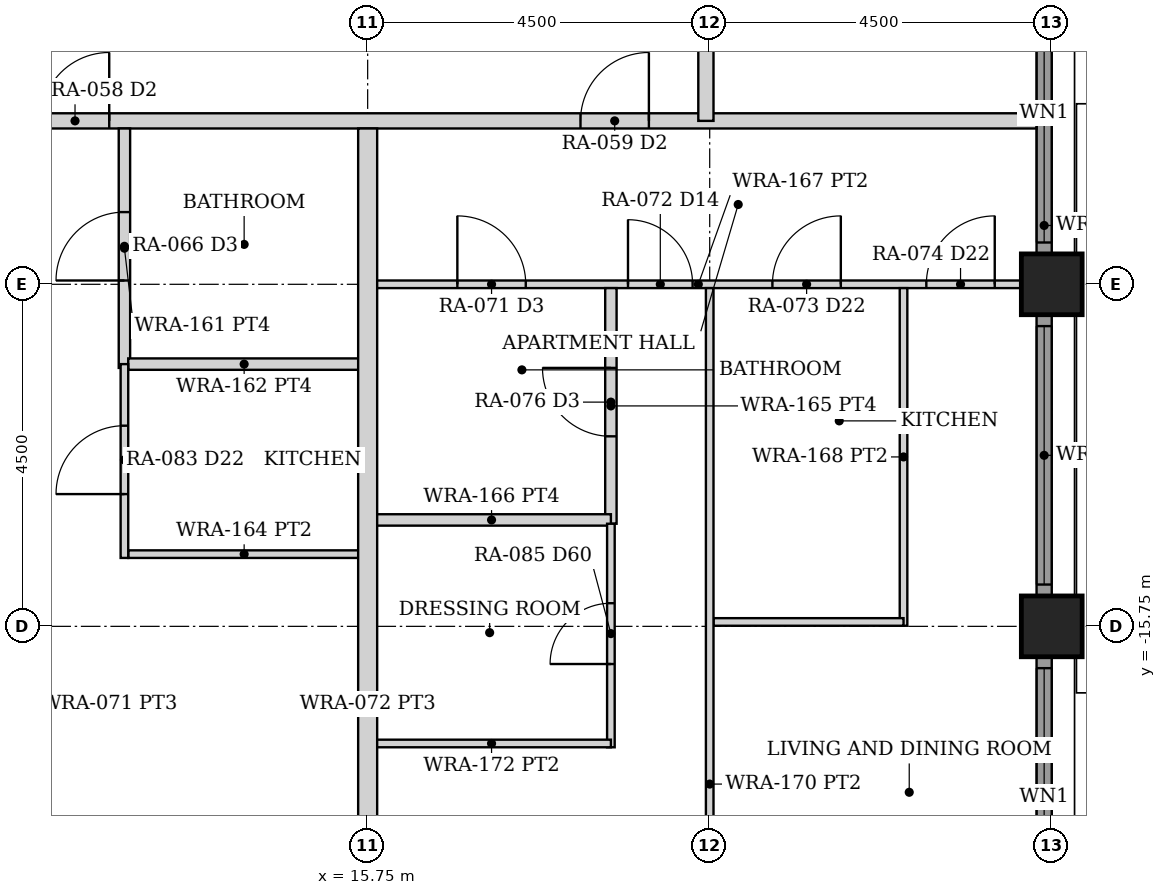
"""IFC4 building model, lengths in metres.
Left out: names, types, materials, properties, quantities, classifications, styles, units other than length and angle.
Written with IfcOpenShell. Run it as: python <this file> out.ifc"""

import sys

from ifc_helpers import new_model, si_unit, direction, frame, frame_2d, origin, origin_2d, place, context, subcontext, project, spatial, rectangle, hollow_rectangle, extrude, element, fill, save


model = new_model("IFC4")
c1 = context("Model", 3, precision=1e-05, world=origin(), true_north=direction((0.0, 1.0)))
c2 = subcontext(c1, "Body", "Model", "MODEL_VIEW")
j1 = project(units=[si_unit("LENGTHUNIT", "METRE"), si_unit("PLANEANGLEUNIT", "RADIAN")], contexts=[c1])
p1 = place(None, origin())
s1 = spatial("IfcSite", under=j1, at=p1, CompositionType="ELEMENT")
p2 = place(p1, origin())
s2 = spatial("IfcBuilding", under=s1, at=p2, CompositionType="ELEMENT")
p3 = place(p2, frame((0.0, 0.0, 26.5)))
s3 = spatial("IfcBuildingStorey", under=s2, at=p3, CompositionType="ELEMENT", Elevation=26.5)
for number, where, z_axis, x_axis in (
    (1, (24.75, -15.75, 0.0), (0.0, 0.0, 1.0), (1.0, 0.0, 0.0)),
    (2, (24.75, -11.25, 0.0), (0.0, 0.0, 1.0), (1.0, 0.0, 0.0)),
):
    element("IfcColumn", number, at=place(p3, frame(where, z_axis=z_axis, x_axis=x_axis)), inside=s3, PredefinedType="COLUMN", context=c2, shape_type="SweptSolid", body=[
        extrude(hollow_rectangle(XDim=0.8, YDim=0.8, WallThickness=0.08, at=origin_2d()), origin(), (0.0, 0.0, 1.0), 3.5),
    ])
p4 = place(p3, frame((24.65, -19.845, 0.0), z_axis=(0.0, 0.0, 1.0), x_axis=(0.0, 1.0, 0.0)))
e3 = element("IfcWall", 3, at=p4, inside=s3, PredefinedType="SOLIDWALL", context=c2, shape_type="SweptSolid", body=[
    extrude(rectangle(XDim=3.69, YDim=0.2, at=frame_2d((1.845, 0.0))), origin(), (0.0, 0.0, 1.0), 2.379),
])
p5 = place(p4, frame((0.145, 0.0, 0.3)))
e4 = element("IfcOpeningElement", 4, at=p5, cuts=e3, PredefinedType="OPENING", context=c2, shape_type="SweptSolid", body=[
    extrude(rectangle(XDim=3.4, YDim=1.929, at=frame_2d((1.7, 0.964))), frame((0.0, 0.11, 0.0), z_axis=(0.0, -1.0, 0.0), x_axis=(1.0, 0.0, 0.0)), (0.0, 0.0, 1.0), 0.22),
])
p6 = place(p3, frame((24.65, -15.345, 0.0), z_axis=(0.0, 0.0, 1.0), x_axis=(0.0, 1.0, 0.0)))
e5 = element("IfcWall", 5, at=p6, inside=s3, PredefinedType="SOLIDWALL", context=c2, shape_type="SweptSolid", body=[
    extrude(rectangle(XDim=3.69, YDim=0.2, at=frame_2d((1.845, 0.0))), origin(), (0.0, 0.0, 1.0), 2.379),
])
p7 = place(p6, frame((0.145, 0.0, 0.3)))
e6 = element("IfcOpeningElement", 6, at=p7, cuts=e5, PredefinedType="OPENING", context=c2, shape_type="SweptSolid", body=[
    extrude(rectangle(XDim=3.4, YDim=1.929, at=frame_2d((1.7, 0.964))), frame((0.0, 0.11, 0.0), z_axis=(0.0, -1.0, 0.0), x_axis=(1.0, 0.0, 0.0)), (0.0, 0.0, 1.0), 0.22),
])
p8 = place(p3, frame((24.65, -10.845, 0.0), z_axis=(0.0, 0.0, 1.0), x_axis=(0.0, 1.0, 0.0)))
e7 = element("IfcWall", 7, at=p8, inside=s3, PredefinedType="SOLIDWALL", context=c2, shape_type="SweptSolid", body=[
    extrude(rectangle(XDim=3.69, YDim=0.2, at=frame_2d((1.845, 0.0))), origin(), (0.0, 0.0, 1.0), 2.379),
])
p9 = place(p8, frame((0.145, 0.0, 0.3)))
e8 = element("IfcOpeningElement", 8, at=p9, cuts=e7, PredefinedType="OPENING", context=c2, shape_type="SweptSolid", body=[
    extrude(rectangle(XDim=3.4, YDim=1.929, at=frame_2d((1.7, 0.964))), frame((0.0, 0.11, 0.0), z_axis=(0.0, -1.0, 0.0), x_axis=(1.0, 0.0, 0.0)), (0.0, 0.0, 1.0), 0.22),
])
p10 = place(p3, frame((-24.55, -9.1, 0.0), z_axis=(0.0, 0.0, 1.0), x_axis=(1.0, 0.0, 0.0)))
e9 = element("IfcWall", 9, at=p10, inside=s3, PredefinedType="PARTITIONING", context=c2, shape_type="SweptSolid", body=[
    extrude(rectangle(XDim=49.1, YDim=0.2, at=frame_2d((24.55, 0.0))), origin(), (0.0, 0.0, 1.0), 2.373),
])
p11 = place(p10, frame((5.1, 0.0, 0.0)))
e10 = element("IfcOpeningElement", 10, at=p11, cuts=e9, PredefinedType="OPENING", context=c2, shape_type="SweptSolid", body=[
    extrude(rectangle(XDim=0.9, YDim=2.1, at=frame_2d((0.45, 1.05))), frame((0.0, 0.11, 0.0), z_axis=(0.0, -1.0, 0.0), x_axis=(1.0, 0.0, 0.0)), (0.0, 0.0, 1.0), 0.22),
])
p12 = place(p10, frame((9.0, 0.0, 0.0)))
e11 = element("IfcOpeningElement", 11, at=p12, cuts=e9, PredefinedType="OPENING", context=c2, shape_type="SweptSolid", body=[
    extrude(rectangle(XDim=0.9, YDim=2.1, at=frame_2d((0.45, 1.05))), frame((0.0, 0.11, 0.0), z_axis=(0.0, -1.0, 0.0), x_axis=(1.0, 0.0, 0.0)), (0.0, 0.0, 1.0), 0.22),
])
p13 = place(p10, frame((13.5, 0.0, 0.0)))
e12 = element("IfcOpeningElement", 12, at=p13, cuts=e9, PredefinedType="OPENING", context=c2, shape_type="SweptSolid", body=[
    extrude(rectangle(XDim=0.9, YDim=2.1, at=frame_2d((0.45, 1.05))), frame((0.0, 0.11, 0.0), z_axis=(0.0, -1.0, 0.0), x_axis=(1.0, 0.0, 0.0)), (0.0, 0.0, 1.0), 0.22),
])
p14 = place(p10, frame((18.0, 0.0, 0.0)))
e13 = element("IfcOpeningElement", 13, at=p14, cuts=e9, PredefinedType="OPENING", context=c2, shape_type="SweptSolid", body=[
    extrude(rectangle(XDim=0.9, YDim=2.1, at=frame_2d((0.45, 1.05))), frame((0.0, 0.11, 0.0), z_axis=(0.0, -1.0, 0.0), x_axis=(1.0, 0.0, 0.0)), (0.0, 0.0, 1.0), 0.22),
])
p15 = place(p10, frame((22.5, 0.0, 0.0)))
e14 = element("IfcOpeningElement", 14, at=p15, cuts=e9, PredefinedType="OPENING", context=c2, shape_type="SweptSolid", body=[
    extrude(rectangle(XDim=0.9, YDim=2.1, at=frame_2d((0.45, 1.05))), frame((0.0, 0.11, 0.0), z_axis=(0.0, -1.0, 0.0), x_axis=(1.0, 0.0, 0.0)), (0.0, 0.0, 1.0), 0.22),
])
p16 = place(p10, frame((27.0, 0.0, 0.0)))
e15 = element("IfcOpeningElement", 15, at=p16, cuts=e9, PredefinedType="OPENING", context=c2, shape_type="SweptSolid", body=[
    extrude(rectangle(XDim=0.9, YDim=2.1, at=frame_2d((0.45, 1.05))), frame((0.0, 0.11, 0.0), z_axis=(0.0, -1.0, 0.0), x_axis=(1.0, 0.0, 0.0)), (0.0, 0.0, 1.0), 0.22),
])
p17 = place(p10, frame((31.5, 0.0, 0.0)))
e16 = element("IfcOpeningElement", 16, at=p17, cuts=e9, PredefinedType="OPENING", context=c2, shape_type="SweptSolid", body=[
    extrude(rectangle(XDim=0.9, YDim=2.1, at=frame_2d((0.45, 1.05))), frame((0.0, 0.11, 0.0), z_axis=(0.0, -1.0, 0.0), x_axis=(1.0, 0.0, 0.0)), (0.0, 0.0, 1.0), 0.22),
])
p18 = place(p10, frame((36.0, 0.0, 0.0)))
e17 = element("IfcOpeningElement", 17, at=p18, cuts=e9, PredefinedType="OPENING", context=c2, shape_type="SweptSolid", body=[
    extrude(rectangle(XDim=0.9, YDim=2.1, at=frame_2d((0.45, 1.05))), frame((0.0, 0.11, 0.0), z_axis=(0.0, -1.0, 0.0), x_axis=(1.0, 0.0, 0.0)), (0.0, 0.0, 1.0), 0.22),
])
p19 = place(p10, frame((43.1, 0.0, 0.0)))
e18 = element("IfcOpeningElement", 18, at=p19, cuts=e9, PredefinedType="OPENING", context=c2, shape_type="SweptSolid", body=[
    extrude(rectangle(XDim=0.9, YDim=2.1, at=frame_2d((0.45, 1.05))), frame((0.0, 0.11, 0.0), z_axis=(0.0, -1.0, 0.0), x_axis=(1.0, 0.0, 0.0)), (0.0, 0.0, 1.0), 0.22),
])
p20 = place(p3, frame((20.2, -9.1, 0.0), z_axis=(0.0, 0.0, 1.0), x_axis=(0.0, 1.0, 0.0)))
e19 = element("IfcWall", 19, at=p20, inside=s3, PredefinedType="PARTITIONING", context=c2, shape_type="SweptSolid", body=[
    extrude(rectangle(XDim=18.2, YDim=0.2, at=frame_2d((9.1, 0.0))), origin(), (0.0, 0.0, 1.0), 2.373),
])
p21 = place(p20, frame((6.4, 0.0, 0.0)))
e20 = element("IfcOpeningElement", 20, at=p21, cuts=e19, PredefinedType="OPENING", context=c2, shape_type="SweptSolid", body=[
    extrude(rectangle(XDim=0.9, YDim=2.1, at=frame_2d((0.45, 1.05))), frame((0.0, 0.11, 0.0), z_axis=(0.0, -1.0, 0.0), x_axis=(1.0, 0.0, 0.0)), (0.0, 0.0, 1.0), 0.22),
])
p22 = place(p3, frame((12.55, -12.35, 0.0), z_axis=(0.0, 0.0, 1.0), x_axis=(0.0, 1.0, 0.0)))
e21 = element("IfcWall", 21, at=p22, inside=s3, PredefinedType="PARTITIONING", context=c2, shape_type="SweptSolid", body=[
    extrude(rectangle(XDim=3.15, YDim=0.15, at=frame_2d((1.575, 0.0))), origin(), (0.0, 0.0, 1.0), 2.373),
])
p23 = place(p22, frame((1.15, 0.0, 0.0)))
e22 = element("IfcOpeningElement", 22, at=p23, cuts=e21, PredefinedType="OPENING", context=c2, shape_type="SweptSolid", body=[
    extrude(rectangle(XDim=0.9, YDim=2.1, at=frame_2d((0.45, 1.05))), frame((0.0, 0.085, 0.0), z_axis=(0.0, -1.0, 0.0), x_axis=(1.0, 0.0, 0.0)), (0.0, 0.0, 1.0), 0.17),
])
p24 = place(p3, frame((12.6, -12.3, 0.0), z_axis=(0.0, 0.0, 1.0), x_axis=(1.0, 0.0, 0.0)))
e23 = element("IfcWall", 23, at=p24, inside=s3, PredefinedType="PARTITIONING", context=c2, shape_type="SweptSolid", body=[
    extrude(rectangle(XDim=3.05, YDim=0.15, at=frame_2d((1.525, 0.0))), origin(), (0.0, 0.0, 1.0), 2.373),
])
p25 = place(p3, frame((12.6, -14.8, 0.0), z_axis=(0.0, 0.0, 1.0), x_axis=(1.0, 0.0, 0.0)))
e24 = element("IfcWall", 24, at=p25, inside=s3, PredefinedType="PARTITIONING", context=c2, shape_type="SweptSolid", body=[
    extrude(rectangle(XDim=3.05, YDim=0.1, at=frame_2d((1.525, 0.0))), origin(), (0.0, 0.0, 1.0), 2.373),
])
p26 = place(p3, frame((12.55, -14.85, 0.0), z_axis=(0.0, 0.0, 1.0), x_axis=(0.0, 1.0, 0.0)))
e25 = element("IfcWall", 25, at=p26, inside=s3, PredefinedType="PARTITIONING", context=c2, shape_type="SweptSolid", body=[
    extrude(rectangle(XDim=2.55, YDim=0.1, at=frame_2d((1.275, 0.0))), origin(), (0.0, 0.0, 1.0), 2.373),
])
p27 = place(p26, frame((0.84, 0.0, 0.0)))
e26 = element("IfcOpeningElement", 26, at=p27, cuts=e25, PredefinedType="OPENING", context=c2, shape_type="SweptSolid", body=[
    extrude(rectangle(XDim=0.9, YDim=2.1, at=frame_2d((0.45, 1.05))), frame((0.0, 0.06, 0.0), z_axis=(0.0, -1.0, 0.0), x_axis=(1.0, 0.0, 0.0)), (0.0, 0.0, 1.0), 0.12),
])
p28 = place(p3, frame((15.85, -11.25, 0.0), z_axis=(0.0, 0.0, 1.0), x_axis=(1.0, 0.0, 0.0)))
e27 = element("IfcWall", 27, at=p28, inside=s3, PredefinedType="PARTITIONING", context=c2, shape_type="SweptSolid", body=[
    extrude(rectangle(XDim=8.5, YDim=0.1, at=frame_2d((4.25, 0.0))), origin(), (0.0, 0.0, 1.0), 2.373),
])
p29 = place(p28, frame((5.225, 0.0, 0.0)))
e28 = element("IfcOpeningElement", 28, at=p29, cuts=e27, PredefinedType="OPENING", context=c2, shape_type="SweptSolid", body=[
    extrude(rectangle(XDim=0.9, YDim=2.1, at=frame_2d((0.45, 1.05))), frame((0.0, 0.06, 0.0), z_axis=(0.0, -1.0, 0.0), x_axis=(1.0, 0.0, 0.0)), (0.0, 0.0, 1.0), 0.12),
])
p30 = place(p28, frame((7.25, 0.0, 0.0)))
e29 = element("IfcOpeningElement", 29, at=p30, cuts=e27, PredefinedType="OPENING", context=c2, shape_type="SweptSolid", body=[
    extrude(rectangle(XDim=0.9, YDim=2.1, at=frame_2d((0.45, 1.05))), frame((0.0, 0.06, 0.0), z_axis=(0.0, -1.0, 0.0), x_axis=(1.0, 0.0, 0.0)), (0.0, 0.0, 1.0), 0.12),
])
p31 = place(p28, frame((3.325, 0.0, 0.0)))
e30 = element("IfcOpeningElement", 30, at=p31, cuts=e27, PredefinedType="OPENING", context=c2, shape_type="SweptSolid", body=[
    extrude(rectangle(XDim=0.85, YDim=2.1, at=frame_2d((0.425, 1.05))), frame((0.0, 0.06, 0.0), z_axis=(0.0, -1.0, 0.0), x_axis=(1.0, 0.0, 0.0)), (0.0, 0.0, 1.0), 0.12),
])
p32 = place(p28, frame((1.08, 0.0, 0.0)))
e31 = element("IfcOpeningElement", 31, at=p32, cuts=e27, PredefinedType="OPENING", context=c2, shape_type="SweptSolid", body=[
    extrude(rectangle(XDim=0.9, YDim=2.1, at=frame_2d((0.45, 1.05))), frame((0.0, 0.06, 0.0), z_axis=(0.0, -1.0, 0.0), x_axis=(1.0, 0.0, 0.0)), (0.0, 0.0, 1.0), 0.12),
])
p33 = place(p3, frame((22.8, -15.742, 0.0), z_axis=(0.0, 0.0, 1.0), x_axis=(0.0, 1.0, 0.0)))
e32 = element("IfcWall", 32, at=p33, inside=s3, PredefinedType="PARTITIONING", context=c2, shape_type="SweptSolid", body=[
    extrude(rectangle(XDim=4.442, YDim=0.1, at=frame_2d((2.221, 0.0))), origin(), (0.0, 0.0, 1.0), 2.373),
])
p34 = place(p3, frame((20.3, -15.692, 0.0), z_axis=(0.0, 0.0, 1.0), x_axis=(1.0, 0.0, 0.0)))
e33 = element("IfcWall", 33, at=p34, inside=s3, PredefinedType="PARTITIONING", context=c2, shape_type="SweptSolid", body=[
    extrude(rectangle(XDim=2.5, YDim=0.1, at=frame_2d((1.25, 0.0))), origin(), (0.0, 0.0, 1.0), 2.373),
])
p35 = place(p3, frame((20.25, -24.35, 0.0), z_axis=(0.0, 0.0, 1.0), x_axis=(0.0, 1.0, 0.0)))
e34 = element("IfcWall", 34, at=p35, inside=s3, PredefinedType="PARTITIONING", context=c2, shape_type="SweptSolid", body=[
    extrude(rectangle(XDim=13.05, YDim=0.1, at=frame_2d((6.525, 0.0))), origin(), (0.0, 0.0, 1.0), 2.373),
])
p36 = place(p3, frame((18.95, -14.4, 0.0), z_axis=(0.0, 0.0, 1.0), x_axis=(0.0, 1.0, 0.0)))
e35 = element("IfcWall", 35, at=p36, inside=s3, PredefinedType="PARTITIONING", context=c2, shape_type="SweptSolid", body=[
    extrude(rectangle(XDim=3.1, YDim=0.15, at=frame_2d((1.55, 0.0))), origin(), (0.0, 0.0, 1.0), 2.373),
])
p37 = place(p36, frame((1.15, 0.0, 0.0)))
e36 = element("IfcOpeningElement", 36, at=p37, cuts=e35, PredefinedType="OPENING", context=c2, shape_type="SweptSolid", body=[
    extrude(rectangle(XDim=0.9, YDim=2.1, at=frame_2d((0.45, 1.05))), frame((0.0, 0.085, 0.0), z_axis=(0.0, -1.0, 0.0), x_axis=(1.0, 0.0, 0.0)), (0.0, 0.0, 1.0), 0.17),
])
p38 = place(p3, frame((15.81, -14.35, 0.0), z_axis=(0.0, 0.0, 1.0), x_axis=(1.0, 0.0, 0.0)))
e37 = element("IfcWall", 37, at=p38, inside=s3, PredefinedType="PARTITIONING", context=c2, shape_type="SweptSolid", body=[
    extrude(rectangle(XDim=3.14, YDim=0.15, at=frame_2d((1.57, 0.0))), origin(), (0.0, 0.0, 1.0), 2.373),
])
p39 = place(p3, frame((18.95, -17.341, 0.0), z_axis=(0.0, 0.0, 1.0), x_axis=(0.0, 1.0, 0.0)))
e38 = element("IfcWall", 38, at=p39, inside=s3, PredefinedType="PARTITIONING", context=c2, shape_type="SweptSolid", body=[
    extrude(rectangle(XDim=2.941, YDim=0.1, at=frame_2d((1.47, 0.0))), origin(), (0.0, 0.0, 1.0), 2.373),
])
p40 = place(p39, frame((1.095, 0.0, 0.0)))
e39 = element("IfcOpeningElement", 39, at=p40, cuts=e38, PredefinedType="OPENING", context=c2, shape_type="SweptSolid", body=[
    extrude(rectangle(XDim=0.8, YDim=2.1, at=frame_2d((0.4, 1.05))), frame((0.0, 0.06, 0.0), z_axis=(0.0, -1.0, 0.0), x_axis=(1.0, 0.0, 0.0)), (0.0, 0.0, 1.0), 0.12),
])
p41 = place(p3, frame((15.81, -17.291, 0.0), z_axis=(0.0, 0.0, 1.0), x_axis=(1.0, 0.0, 0.0)))
e40 = element("IfcWall", 40, at=p41, inside=s3, PredefinedType="PARTITIONING", context=c2, shape_type="SweptSolid", body=[
    extrude(rectangle(XDim=3.14, YDim=0.1, at=frame_2d((1.57, 0.0))), origin(), (0.0, 0.0, 1.0), 2.373),
])
p42 = place(p3, frame((15.75, -24.35, 0.0), z_axis=(0.0, 0.0, 1.0), x_axis=(0.0, 1.0, 0.0)))
e41 = element("IfcWall", 41, at=p42, inside=s3, PredefinedType="PARTITIONING", context=c2, shape_type="SweptSolid", body=[
    extrude(rectangle(XDim=15.15, YDim=0.25, at=frame_2d((7.575, 0.0))), origin(), (0.0, 0.0, 1.0), 2.373),
])
p43 = place(p5, origin())
e42 = element("IfcWindow", 42, at=p43, inside=s3, PartitioningType="SINGLE_PANEL", PredefinedType="WINDOW", context=c2, shape_type="SweptSolid", body=[
    extrude(rectangle(XDim=3.4, YDim=1.929, at=frame_2d((1.7, 0.964))), frame((0.0, 0.03, 0.0), z_axis=(0.0, -1.0, 0.0), x_axis=(1.0, 0.0, 0.0)), (0.0, 0.0, 1.0), 0.06),
])
fill(e4, e42)
p44 = place(p7, origin())
e43 = element("IfcWindow", 43, at=p44, inside=s3, PartitioningType="SINGLE_PANEL", PredefinedType="WINDOW", context=c2, shape_type="SweptSolid", body=[
    extrude(rectangle(XDim=3.4, YDim=1.929, at=frame_2d((1.7, 0.964))), frame((0.0, 0.03, 0.0), z_axis=(0.0, -1.0, 0.0), x_axis=(1.0, 0.0, 0.0)), (0.0, 0.0, 1.0), 0.06),
])
fill(e6, e43)
p45 = place(p9, origin())
e44 = element("IfcWindow", 44, at=p45, inside=s3, PartitioningType="SINGLE_PANEL", PredefinedType="WINDOW", context=c2, shape_type="SweptSolid", body=[
    extrude(rectangle(XDim=3.4, YDim=1.929, at=frame_2d((1.7, 0.964))), frame((0.0, 0.03, 0.0), z_axis=(0.0, -1.0, 0.0), x_axis=(1.0, 0.0, 0.0)), (0.0, 0.0, 1.0), 0.06),
])
fill(e8, e44)
p46 = place(p18, origin())
e45 = element("IfcDoor", 45, at=p46, inside=s3, OperationType="SINGLE_SWING_RIGHT", PredefinedType="DOOR", context=c2, shape_type="SweptSolid", body=[
    extrude(rectangle(XDim=0.9, YDim=2.1, at=frame_2d((0.45, 1.05))), frame((0.0, 0.025, 0.0), z_axis=(0.0, -1.0, 0.0), x_axis=(1.0, 0.0, 0.0)), (0.0, 0.0, 1.0), 0.05),
])
fill(e17, e45)
p47 = place(p23, origin())
e46 = element("IfcDoor", 46, at=p47, inside=s3, OperationType="SINGLE_SWING_LEFT", PredefinedType="DOOR", context=c2, shape_type="SweptSolid", body=[
    extrude(rectangle(XDim=0.9, YDim=2.1, at=frame_2d((0.45, 1.05))), frame((0.0, 0.025, 0.0), z_axis=(0.0, -1.0, 0.0), x_axis=(1.0, 0.0, 0.0)), (0.0, 0.0, 1.0), 0.05),
])
fill(e22, e46)
p48 = place(p27, origin())
e47 = element("IfcDoor", 47, at=p48, inside=s3, OperationType="SINGLE_SWING_LEFT", PredefinedType="DOOR", context=c2, shape_type="SweptSolid", body=[
    extrude(rectangle(XDim=0.9, YDim=2.1, at=frame_2d((0.45, 1.05))), frame((0.0, 0.025, 0.0), z_axis=(0.0, -1.0, 0.0), x_axis=(1.0, 0.0, 0.0)), (0.0, 0.0, 1.0), 0.05),
])
fill(e26, e47)
p49 = place(p19, origin())
e48 = element("IfcDoor", 48, at=p49, inside=s3, OperationType="SINGLE_SWING_RIGHT", PredefinedType="DOOR", context=c2, shape_type="SweptSolid", body=[
    extrude(rectangle(XDim=0.9, YDim=2.1, at=frame_2d((0.45, 1.05))), frame((0.0, 0.025, 0.0), z_axis=(0.0, -1.0, 0.0), x_axis=(1.0, 0.0, 0.0)), (0.0, 0.0, 1.0), 0.05),
])
fill(e18, e48)
p50 = place(p29, origin())
e49 = element("IfcDoor", 49, at=p50, inside=s3, OperationType="SINGLE_SWING_RIGHT", PredefinedType="DOOR", context=c2, shape_type="SweptSolid", body=[
    extrude(rectangle(XDim=0.9, YDim=2.1, at=frame_2d((0.45, 1.05))), frame((0.0, 0.025, 0.0), z_axis=(0.0, -1.0, 0.0), x_axis=(1.0, 0.0, 0.0)), (0.0, 0.0, 1.0), 0.05),
])
fill(e28, e49)
p51 = place(p30, origin())
e50 = element("IfcDoor", 50, at=p51, inside=s3, OperationType="SINGLE_SWING_RIGHT", PredefinedType="DOOR", context=c2, shape_type="SweptSolid", body=[
    extrude(rectangle(XDim=0.9, YDim=2.1, at=frame_2d((0.45, 1.05))), frame((0.0, 0.025, 0.0), z_axis=(0.0, -1.0, 0.0), x_axis=(1.0, 0.0, 0.0)), (0.0, 0.0, 1.0), 0.05),
])
fill(e29, e50)
p52 = place(p31, origin())
e51 = element("IfcDoor", 51, at=p52, inside=s3, OperationType="SINGLE_SWING_LEFT", PredefinedType="DOOR", context=c2, shape_type="SweptSolid", body=[
    extrude(rectangle(XDim=0.85, YDim=2.1, at=frame_2d((0.425, 1.05))), frame((0.0, 0.025, 0.0), z_axis=(0.0, -1.0, 0.0), x_axis=(1.0, 0.0, 0.0)), (0.0, 0.0, 1.0), 0.05),
])
fill(e30, e51)
p53 = place(p37, origin())
e52 = element("IfcDoor", 52, at=p53, inside=s3, OperationType="SINGLE_SWING_RIGHT", PredefinedType="DOOR", context=c2, shape_type="SweptSolid", body=[
    extrude(rectangle(XDim=0.9, YDim=2.1, at=frame_2d((0.45, 1.05))), frame((0.0, 0.025, 0.0), z_axis=(0.0, -1.0, 0.0), x_axis=(1.0, 0.0, 0.0)), (0.0, 0.0, 1.0), 0.05),
])
fill(e36, e52)
p54 = place(p32, origin())
e53 = element("IfcDoor", 53, at=p54, inside=s3, OperationType="SINGLE_SWING_LEFT", PredefinedType="DOOR", context=c2, shape_type="SweptSolid", body=[
    extrude(rectangle(XDim=0.9, YDim=2.1, at=frame_2d((0.45, 1.05))), frame((0.0, 0.025, 0.0), z_axis=(0.0, -1.0, 0.0), x_axis=(1.0, 0.0, 0.0)), (0.0, 0.0, 1.0), 0.05),
])
fill(e31, e53)
p55 = place(p40, origin())
e54 = element("IfcDoor", 54, at=p55, inside=s3, OperationType="SINGLE_SWING_LEFT", PredefinedType="DOOR", context=c2, shape_type="SweptSolid", body=[
    extrude(rectangle(XDim=0.8, YDim=2.1, at=frame_2d((0.4, 1.05))), frame((0.0, 0.025, 0.0), z_axis=(0.0, -1.0, 0.0), x_axis=(1.0, 0.0, 0.0)), (0.0, 0.0, 1.0), 0.05),
])
fill(e39, e54)
save(model, sys.argv[1])
